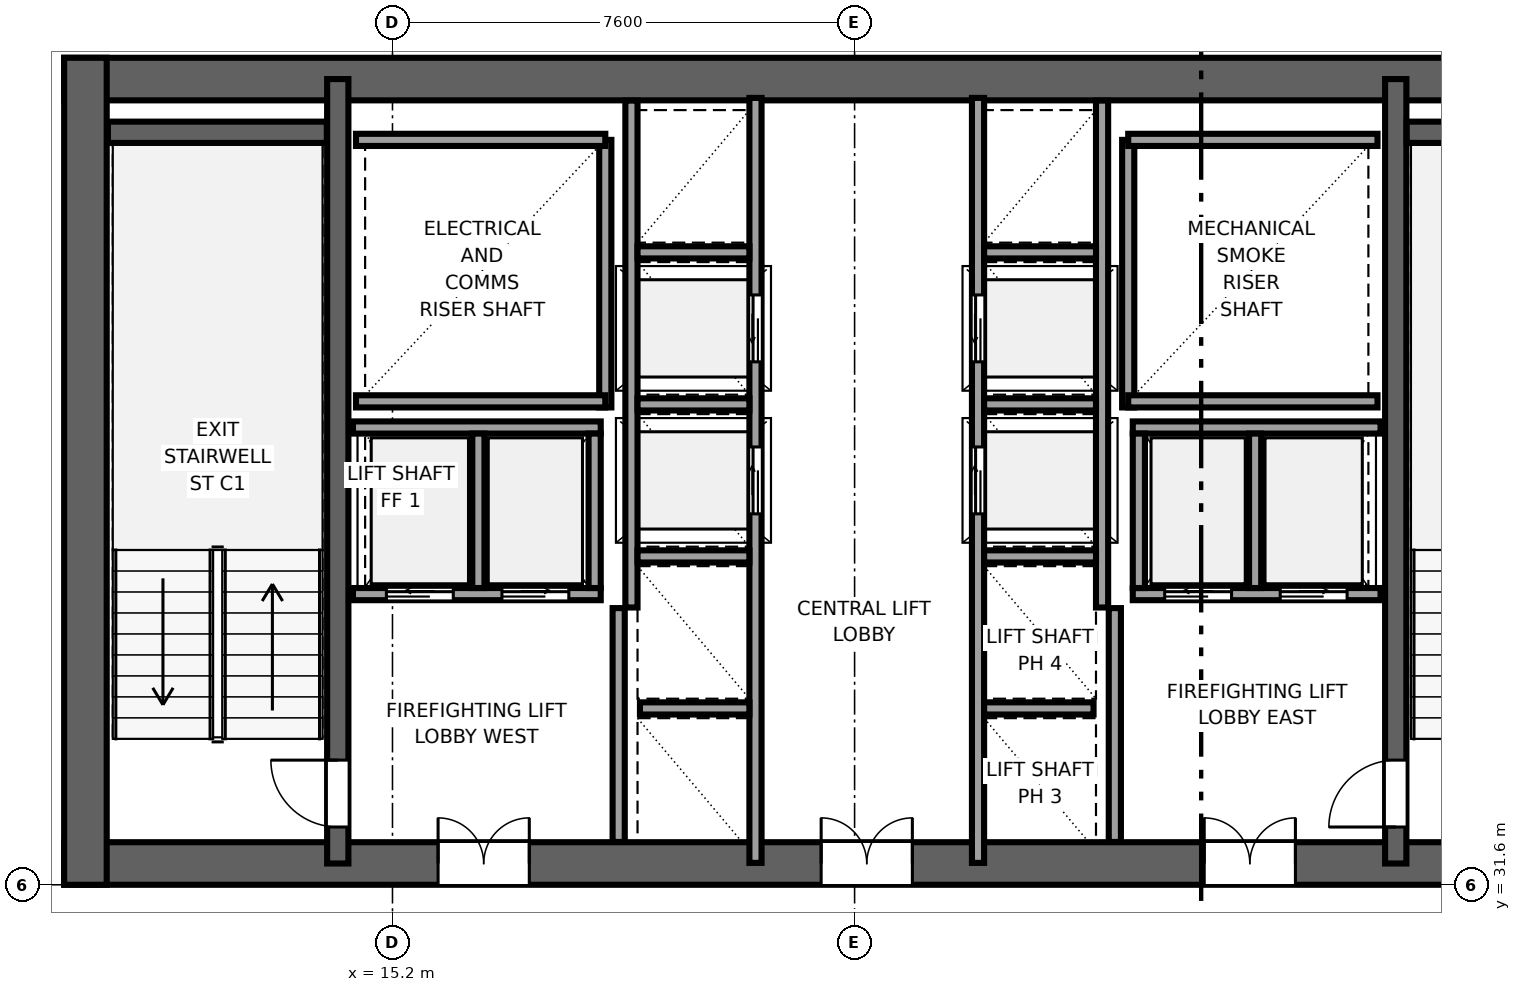
"""IFC4 building model, lengths in metres.
Left out: names, types, materials, properties, quantities, classifications, styles, units other than length and angle.
Written with IfcOpenShell. Run it as: python <this file> out.ifc"""

import sys

from ifc_helpers import new_model, si_unit, direction, frame, frame_2d, origin, place, context, subcontext, project, spatial, rectangle, extrude, source, transform, mapped, element, fill, save


model = new_model("IFC4")
c1 = context("Model", 3, precision=1e-05, world=origin(), true_north=direction((0.0, 1.0)))
c2 = subcontext(c1, "Body", "Model", "MODEL_VIEW")
j1 = project(units=[si_unit("LENGTHUNIT", "METRE"), si_unit("PLANEANGLEUNIT", "RADIAN")], contexts=[c1])
p1 = place(None, origin())
s1 = spatial("IfcSite", under=j1, at=p1, CompositionType="ELEMENT")
p2 = place(p1, origin())
s2 = spatial("IfcBuilding", under=s1, at=p2, CompositionType="ELEMENT")
p3 = place(p2, frame((0.0, 0.0, 150.6)))
s3 = spatial("IfcBuildingStorey", under=s2, at=p3, CompositionType="ELEMENT", Elevation=150.6)
p4 = place(p3, frame((9.8, 31.95, 0.0), z_axis=(0.0, 0.0, 1.0), x_axis=(1.0, 0.0, 0.0)))
e1 = element("IfcWall", 1, at=p4, inside=s3, PredefinedType="SHEAR", context=c2, shape_type="SweptSolid", body=[
    extrude(rectangle(XDim=26.4, YDim=0.7, at=frame_2d((13.2, 0.0))), origin(), (0.0, 0.0, 1.0), 3.55),
])
p5 = place(p4, frame((7.65, 0.0, 0.0), z_axis=(0.0, 0.0, 1.0), x_axis=(-1.0, 0.0, 0.0)))
e2 = element("IfcOpeningElement", 2, at=p5, cuts=e1, PredefinedType="OPENING", context=c2, shape_type="SweptSolid", body=[
    extrude(rectangle(XDim=1.5, YDim=2.04, at=frame_2d((0.75, 1.02))), frame((0.0, 0.36, 0.0), z_axis=(0.0, -1.0, 0.0), x_axis=(1.0, 0.0, 0.0)), (0.0, 0.0, 1.0), 0.72),
])
p6 = place(p4, frame((13.95, 0.0, 0.0), z_axis=(0.0, 0.0, 1.0), x_axis=(-1.0, 0.0, 0.0)))
e3 = element("IfcOpeningElement", 3, at=p6, cuts=e1, PredefinedType="OPENING", context=c2, shape_type="SweptSolid", body=[
    extrude(rectangle(XDim=1.5, YDim=2.04, at=frame_2d((0.75, 1.02))), frame((0.0, 0.36, 0.0), z_axis=(0.0, -1.0, 0.0), x_axis=(1.0, 0.0, 0.0)), (0.0, 0.0, 1.0), 0.72),
])
p7 = place(p4, frame((20.25, 0.0, 0.0), z_axis=(0.0, 0.0, 1.0), x_axis=(-1.0, 0.0, 0.0)))
e4 = element("IfcOpeningElement", 4, at=p7, cuts=e1, PredefinedType="OPENING", context=c2, shape_type="SweptSolid", body=[
    extrude(rectangle(XDim=1.5, YDim=2.04, at=frame_2d((0.75, 1.02))), frame((0.0, 0.36, 0.0), z_axis=(0.0, -1.0, 0.0), x_axis=(1.0, 0.0, 0.0)), (0.0, 0.0, 1.0), 0.72),
])
p8 = place(p3, frame((9.8, 44.85, 0.0), z_axis=(0.0, 0.0, 1.0), x_axis=(1.0, 0.0, 0.0)))
e5 = element("IfcWall", 5, at=p8, inside=s3, PredefinedType="SHEAR", context=c2, shape_type="SweptSolid", body=[
    extrude(rectangle(XDim=26.4, YDim=0.7, at=frame_2d((13.2, 0.0))), origin(), (0.0, 0.0, 1.0), 3.55),
])
p9 = place(p3, frame((10.15, 31.6, 0.0), z_axis=(0.0, 0.0, 1.0), x_axis=(0.0, 1.0, 0.0)))
e6 = element("IfcWall", 6, at=p9, inside=s3, PredefinedType="SHEAR", context=c2, shape_type="SweptSolid", body=[
    extrude(rectangle(XDim=13.6, YDim=0.7, at=frame_2d((6.8, 0.0))), origin(), (0.0, 0.0, 1.0), 3.55),
])
p10 = place(p3, frame((14.3, 31.95, 0.0), z_axis=(0.0, 0.0, 1.0), x_axis=(0.0, 1.0, 0.0)))
e7 = element("IfcWall", 7, at=p10, inside=s3, PredefinedType="SHEAR", context=c2, shape_type="SweptSolid", body=[
    extrude(rectangle(XDim=12.9, YDim=0.35, at=frame_2d((6.45, 0.0))), origin(), (0.0, 0.0, 1.0), 3.55),
])
p11 = place(p10, frame((0.6, 0.0, 0.0)))
e8 = element("IfcOpeningElement", 8, at=p11, cuts=e7, PredefinedType="OPENING", context=c2, shape_type="SweptSolid", body=[
    extrude(rectangle(XDim=1.1, YDim=2.12, at=frame_2d((0.55, 1.06))), frame((0.0, 0.185, 0.0), z_axis=(0.0, -1.0, 0.0), x_axis=(1.0, 0.0, 0.0)), (0.0, 0.0, 1.0), 0.37),
])
p12 = place(p3, frame((31.7, 31.95, 0.0), z_axis=(0.0, 0.0, 1.0), x_axis=(0.0, 1.0, 0.0)))
e9 = element("IfcWall", 9, at=p12, inside=s3, PredefinedType="SHEAR", context=c2, shape_type="SweptSolid", body=[
    extrude(rectangle(XDim=12.9, YDim=0.35, at=frame_2d((6.45, 0.0))), origin(), (0.0, 0.0, 1.0), 3.55),
])
p13 = place(p12, frame((1.7, 0.0, 0.0), z_axis=(0.0, 0.0, 1.0), x_axis=(-1.0, 0.0, 0.0)))
e10 = element("IfcOpeningElement", 10, at=p13, cuts=e9, PredefinedType="OPENING", context=c2, shape_type="SweptSolid", body=[
    extrude(rectangle(XDim=1.1, YDim=2.12, at=frame_2d((0.55, 1.06))), frame((0.0, 0.185, 0.0), z_axis=(0.0, -1.0, 0.0), x_axis=(1.0, 0.0, 0.0)), (0.0, 0.0, 1.0), 0.37),
])
for number, where, z_axis, x_axis in (
    (11, (10.52, 43.975, 0.0), (0.0, 0.0, 1.0), (1.0, 0.0, 0.0)),
    (12, (31.88, 43.975, 0.0), (0.0, 0.0, 1.0), (1.0, 0.0, 0.0)),
):
    element("IfcWall", number, at=place(p3, frame(where, z_axis=z_axis, x_axis=x_axis)), inside=s3, PredefinedType="SHEAR", context=c2, shape_type="SweptSolid", body=[
        extrude(rectangle(XDim=3.6, YDim=0.35, at=frame_2d((1.8, 0.0))), origin(), (0.0, 0.0, 1.0), 3.55),
    ])
p14 = place(p3, frame((18.7, 39.45, 0.0), z_axis=(0.0, 0.0, 1.0), x_axis=(0.0, 1.0, 0.0)))
e13 = element("IfcWall", 13, at=p14, inside=s3, PredefinedType="SOLIDWALL", context=c2, shape_type="SweptSolid", body=[
    extrude(rectangle(XDim=4.4, YDim=0.2, at=frame_2d((2.2, 0.0))), origin(), (0.0, 0.0, 1.0), 3.37),
])
for number, where, z_axis, x_axis in (
    (14, (14.6, 39.55, 0.0), (0.0, 0.0, 1.0), (1.0, 0.0, 0.0)),
    (15, (14.6, 43.85, 0.0), (0.0, 0.0, 1.0), (1.0, 0.0, 0.0)),
):
    element("IfcWall", number, at=place(p3, frame(where, z_axis=z_axis, x_axis=x_axis)), inside=s3, PredefinedType="SOLIDWALL", context=c2, shape_type="SweptSolid", body=[
        extrude(rectangle(XDim=4.1, YDim=0.2, at=frame_2d((2.05, 0.0))), origin(), (0.0, 0.0, 1.0), 3.37),
    ])
p15 = place(p3, frame((27.3, 39.45, 0.0), z_axis=(0.0, 0.0, 1.0), x_axis=(0.0, 1.0, 0.0)))
e16 = element("IfcWall", 16, at=p15, inside=s3, PredefinedType="SOLIDWALL", context=c2, shape_type="SweptSolid", body=[
    extrude(rectangle(XDim=4.4, YDim=0.2, at=frame_2d((2.2, 0.0))), origin(), (0.0, 0.0, 1.0), 3.37),
])
for number, where, z_axis, x_axis in (
    (17, (27.3, 39.55, 0.0), (0.0, 0.0, 1.0), (1.0, 0.0, 0.0)),
    (18, (27.3, 43.85, 0.0), (0.0, 0.0, 1.0), (1.0, 0.0, 0.0)),
):
    element("IfcWall", number, at=place(p3, frame(where, z_axis=z_axis, x_axis=x_axis)), inside=s3, PredefinedType="SOLIDWALL", context=c2, shape_type="SweptSolid", body=[
        extrude(rectangle(XDim=4.1, YDim=0.2, at=frame_2d((2.05, 0.0))), origin(), (0.0, 0.0, 1.0), 3.37),
    ])
for number, where, z_axis, x_axis in (
    (19, (18.92, 32.304, 0.0), (0.0, 0.0, 1.0), (0.0, 1.0, 0.0)),
    (20, (27.08, 32.304, 0.0), (0.0, 0.0, 1.0), (0.0, 1.0, 0.0)),
):
    element("IfcWall", number, at=place(p3, frame(where, z_axis=z_axis, x_axis=x_axis)), inside=s3, PredefinedType="SOLIDWALL", context=c2, shape_type="SweptSolid", body=[
        extrude(rectangle(XDim=3.846, YDim=0.2, at=frame_2d((1.923, 0.0))), origin(), (0.0, 0.0, 1.0), 3.37),
    ])
p16 = place(p3, frame((21.17, 31.96, 0.0), z_axis=(0.0, 0.0, 1.0), x_axis=(0.0, 1.0, 0.0)))
e21 = element("IfcWall", 21, at=p16, inside=s3, PredefinedType="SOLIDWALL", context=c2, shape_type="SweptSolid", body=[
    extrude(rectangle(XDim=12.58, YDim=0.2, at=frame_2d((6.29, 0.0))), origin(), (0.0, 0.0, 1.0), 3.37),
])
p17 = place(p16, frame((5.74, 0.0, 0.0)))
e22 = element("IfcOpeningElement", 22, at=p17, cuts=e21, PredefinedType="OPENING", context=c2, shape_type="SweptSolid", body=[
    extrude(rectangle(XDim=1.1, YDim=2.12, at=frame_2d((0.55, 1.06))), frame((0.0, 0.11, 0.0), z_axis=(0.0, -1.0, 0.0), x_axis=(1.0, 0.0, 0.0)), (0.0, 0.0, 1.0), 0.22),
])
p18 = place(p16, frame((8.24, 0.0, 0.0)))
e23 = element("IfcOpeningElement", 23, at=p18, cuts=e21, PredefinedType="OPENING", context=c2, shape_type="SweptSolid", body=[
    extrude(rectangle(XDim=1.1, YDim=2.12, at=frame_2d((0.55, 1.06))), frame((0.0, 0.11, 0.0), z_axis=(0.0, -1.0, 0.0), x_axis=(1.0, 0.0, 0.0)), (0.0, 0.0, 1.0), 0.22),
])
p19 = place(p3, frame((19.13, 36.16, 0.0), z_axis=(0.0, 0.0, 1.0), x_axis=(0.0, 1.0, 0.0)))
e24 = element("IfcWall", 24, at=p19, inside=s3, PredefinedType="SOLIDWALL", context=c2, shape_type="SweptSolid", body=[
    extrude(rectangle(XDim=8.336, YDim=0.2, at=frame_2d((4.168, 0.0))), origin(), (0.0, 0.0, 1.0), 3.37),
])
p20 = place(p3, frame((19.27, 34.5, 0.0), z_axis=(0.0, 0.0, 1.0), x_axis=(1.0, 0.0, 0.0)))
e25 = element("IfcWall", 25, at=p20, inside=s3, PredefinedType="SOLIDWALL", context=c2, shape_type="SweptSolid", body=[
    extrude(rectangle(XDim=1.8, YDim=0.2, at=frame_2d((0.9, 0.0))), origin(), (0.0, 0.0, 1.0), 3.37),
])
for number, where, z_axis, x_axis in (
    (26, (19.23, 37.0, 0.0), (0.0, 0.0, 1.0), (1.0, 0.0, 0.0)),
    (27, (19.23, 39.5, 0.0), (0.0, 0.0, 1.0), (1.0, 0.0, 0.0)),
    (28, (19.23, 42.0, 0.0), (0.0, 0.0, 1.0), (1.0, 0.0, 0.0)),
):
    element("IfcWall", number, at=place(p3, frame(where, z_axis=z_axis, x_axis=x_axis)), inside=s3, PredefinedType="SOLIDWALL", context=c2, shape_type="SweptSolid", body=[
        extrude(rectangle(XDim=1.84, YDim=0.2, at=frame_2d((0.92, 0.0))), origin(), (0.0, 0.0, 1.0), 3.37),
    ])
p21 = place(p3, frame((27.375, 36.38, 0.0), z_axis=(0.0, 0.0, 1.0), x_axis=(1.0, 0.0, 0.0)))
e29 = element("IfcWall", 29, at=p21, inside=s3, PredefinedType="SOLIDWALL", context=c2, shape_type="SweptSolid", body=[
    extrude(rectangle(XDim=4.075, YDim=0.2, at=frame_2d((2.038, 0.0))), origin(), (0.0, 0.0, 1.0), 3.37),
])
p22 = place(p21, frame((0.525, 0.0, 0.0)))
e30 = element("IfcOpeningElement", 30, at=p22, cuts=e29, PredefinedType="OPENING", context=c2, shape_type="SweptSolid", body=[
    extrude(rectangle(XDim=1.1, YDim=2.12, at=frame_2d((0.55, 1.06))), frame((0.0, 0.11, 0.0), z_axis=(0.0, -1.0, 0.0), x_axis=(1.0, 0.0, 0.0)), (0.0, 0.0, 1.0), 0.22),
])
p23 = place(p21, frame((2.425, 0.0, 0.0)))
e31 = element("IfcOpeningElement", 31, at=p23, cuts=e29, PredefinedType="OPENING", context=c2, shape_type="SweptSolid", body=[
    extrude(rectangle(XDim=1.1, YDim=2.12, at=frame_2d((0.55, 1.06))), frame((0.0, 0.11, 0.0), z_axis=(0.0, -1.0, 0.0), x_axis=(1.0, 0.0, 0.0)), (0.0, 0.0, 1.0), 0.22),
])
p24 = place(p3, frame((27.375, 39.12, 0.0), z_axis=(0.0, 0.0, 1.0), x_axis=(1.0, 0.0, 0.0)))
e32 = element("IfcWall", 32, at=p24, inside=s3, PredefinedType="SOLIDWALL", context=c2, shape_type="SweptSolid", body=[
    extrude(rectangle(XDim=4.075, YDim=0.2, at=frame_2d((2.038, 0.0))), origin(), (0.0, 0.0, 1.0), 3.37),
])
for number, where, z_axis, x_axis in (
    (33, (27.475, 36.48, 0.0), (0.0, 0.0, 1.0), (0.0, 1.0, 0.0)),
    (34, (29.387, 36.48, 0.0), (0.0, 0.0, 1.0), (0.0, 1.0, 0.0)),
):
    element("IfcWall", number, at=place(p3, frame(where, z_axis=z_axis, x_axis=x_axis)), inside=s3, PredefinedType="SOLIDWALL", context=c2, shape_type="SweptSolid", body=[
        extrude(rectangle(XDim=2.54, YDim=0.2, at=frame_2d((1.27, 0.0))), origin(), (0.0, 0.0, 1.0), 3.37),
    ])
p25 = place(p3, frame((14.55, 36.38, 0.0), z_axis=(0.0, 0.0, 1.0), x_axis=(1.0, 0.0, 0.0)))
e35 = element("IfcWall", 35, at=p25, inside=s3, PredefinedType="SOLIDWALL", context=c2, shape_type="SweptSolid", body=[
    extrude(rectangle(XDim=4.075, YDim=0.2, at=frame_2d((2.038, 0.0))), origin(), (0.0, 0.0, 1.0), 3.37),
])
p26 = place(p25, frame((0.55, 0.0, 0.0)))
e36 = element("IfcOpeningElement", 36, at=p26, cuts=e35, PredefinedType="OPENING", context=c2, shape_type="SweptSolid", body=[
    extrude(rectangle(XDim=1.1, YDim=2.12, at=frame_2d((0.55, 1.06))), frame((0.0, 0.11, 0.0), z_axis=(0.0, -1.0, 0.0), x_axis=(1.0, 0.0, 0.0)), (0.0, 0.0, 1.0), 0.22),
])
p27 = place(p25, frame((2.45, 0.0, 0.0)))
e37 = element("IfcOpeningElement", 37, at=p27, cuts=e35, PredefinedType="OPENING", context=c2, shape_type="SweptSolid", body=[
    extrude(rectangle(XDim=1.1, YDim=2.12, at=frame_2d((0.55, 1.06))), frame((0.0, 0.11, 0.0), z_axis=(0.0, -1.0, 0.0), x_axis=(1.0, 0.0, 0.0)), (0.0, 0.0, 1.0), 0.22),
])
p28 = place(p3, frame((14.55, 39.12, 0.0), z_axis=(0.0, 0.0, 1.0), x_axis=(1.0, 0.0, 0.0)))
e38 = element("IfcWall", 38, at=p28, inside=s3, PredefinedType="SOLIDWALL", context=c2, shape_type="SweptSolid", body=[
    extrude(rectangle(XDim=4.075, YDim=0.2, at=frame_2d((2.038, 0.0))), origin(), (0.0, 0.0, 1.0), 3.37),
])
for number, where, z_axis, x_axis in (
    (39, (18.525, 36.48, 0.0), (0.0, 0.0, 1.0), (0.0, 1.0, 0.0)),
    (40, (16.613, 36.48, 0.0), (0.0, 0.0, 1.0), (0.0, 1.0, 0.0)),
):
    element("IfcWall", number, at=place(p3, frame(where, z_axis=z_axis, x_axis=x_axis)), inside=s3, PredefinedType="SOLIDWALL", context=c2, shape_type="SweptSolid", body=[
        extrude(rectangle(XDim=2.54, YDim=0.2, at=frame_2d((1.27, 0.0))), origin(), (0.0, 0.0, 1.0), 3.37),
    ])
p29 = place(p3, frame((24.83, 31.96, 0.0), z_axis=(0.0, 0.0, 1.0), x_axis=(0.0, 1.0, 0.0)))
e41 = element("IfcWall", 41, at=p29, inside=s3, PredefinedType="SOLIDWALL", context=c2, shape_type="SweptSolid", body=[
    extrude(rectangle(XDim=12.58, YDim=0.2, at=frame_2d((6.29, 0.0))), origin(), (0.0, 0.0, 1.0), 3.37),
])
p30 = place(p29, frame((5.74, 0.0, 0.0)))
e42 = element("IfcOpeningElement", 42, at=p30, cuts=e41, PredefinedType="OPENING", context=c2, shape_type="SweptSolid", body=[
    extrude(rectangle(XDim=1.1, YDim=2.12, at=frame_2d((0.55, 1.06))), frame((0.0, 0.11, 0.0), z_axis=(0.0, -1.0, 0.0), x_axis=(1.0, 0.0, 0.0)), (0.0, 0.0, 1.0), 0.22),
])
p31 = place(p29, frame((8.24, 0.0, 0.0)))
e43 = element("IfcOpeningElement", 43, at=p31, cuts=e41, PredefinedType="OPENING", context=c2, shape_type="SweptSolid", body=[
    extrude(rectangle(XDim=1.1, YDim=2.12, at=frame_2d((0.55, 1.06))), frame((0.0, 0.11, 0.0), z_axis=(0.0, -1.0, 0.0), x_axis=(1.0, 0.0, 0.0)), (0.0, 0.0, 1.0), 0.22),
])
p32 = place(p3, frame((26.87, 36.16, 0.0), z_axis=(0.0, 0.0, 1.0), x_axis=(0.0, 1.0, 0.0)))
e44 = element("IfcWall", 44, at=p32, inside=s3, PredefinedType="SOLIDWALL", context=c2, shape_type="SweptSolid", body=[
    extrude(rectangle(XDim=8.336, YDim=0.2, at=frame_2d((4.168, 0.0))), origin(), (0.0, 0.0, 1.0), 3.37),
])
p33 = place(p3, frame((24.93, 34.5, 0.0), z_axis=(0.0, 0.0, 1.0), x_axis=(1.0, 0.0, 0.0)))
e45 = element("IfcWall", 45, at=p33, inside=s3, PredefinedType="SOLIDWALL", context=c2, shape_type="SweptSolid", body=[
    extrude(rectangle(XDim=1.8, YDim=0.2, at=frame_2d((0.9, 0.0))), origin(), (0.0, 0.0, 1.0), 3.37),
])
for number, where, z_axis, x_axis in (
    (46, (24.93, 37.0, 0.0), (0.0, 0.0, 1.0), (1.0, 0.0, 0.0)),
    (47, (24.93, 39.5, 0.0), (0.0, 0.0, 1.0), (1.0, 0.0, 0.0)),
    (48, (24.93, 42.0, 0.0), (0.0, 0.0, 1.0), (1.0, 0.0, 0.0)),
):
    element("IfcWall", number, at=place(p3, frame(where, z_axis=z_axis, x_axis=x_axis)), inside=s3, PredefinedType="SOLIDWALL", context=c2, shape_type="SweptSolid", body=[
        extrude(rectangle(XDim=1.84, YDim=0.2, at=frame_2d((0.92, 0.0))), origin(), (0.0, 0.0, 1.0), 3.37),
    ])
m1 = source(origin(), c2, "Body", "SweptSolid", [
    extrude(rectangle(XDim=1.1, YDim=2.12, at=frame_2d((0.55, 1.06))), frame((0.0, 0.025, 0.0), z_axis=(0.0, -1.0, 0.0), x_axis=(1.0, 0.0, 0.0)), (0.0, 0.0, 1.0), 0.05),
])
p34 = place(p11, origin())
e49 = element("IfcDoor", 49, at=p34, inside=s3, OperationType="SINGLE_SWING_RIGHT", PredefinedType="DOOR", context=c2, shape_type="MappedRepresentation", body=[
    mapped(m1, transform((0.0, 0.0, 0.0), x_axis=(1.0, 0.0, 0.0), y_axis=(0.0, 1.0, 0.0), z_axis=(0.0, 0.0, 1.0), scale=1.0)),
])
fill(e8, e49)
p35 = place(p13, origin())
e50 = element("IfcDoor", 50, at=p35, inside=s3, OperationType="SINGLE_SWING_LEFT", PredefinedType="DOOR", context=c2, shape_type="MappedRepresentation", body=[
    mapped(m1, transform((0.0, 0.0, 0.0), x_axis=(1.0, 0.0, 0.0), y_axis=(0.0, 1.0, 0.0), z_axis=(0.0, 0.0, 1.0), scale=1.0)),
])
fill(e10, e50)
m2 = source(origin(), c2, "Body", "SweptSolid", [
    extrude(rectangle(XDim=1.5, YDim=2.04, at=frame_2d((0.75, 1.02))), frame((0.0, 0.025, 0.0), z_axis=(0.0, -1.0, 0.0), x_axis=(1.0, 0.0, 0.0)), (0.0, 0.0, 1.0), 0.05),
])
p36 = place(p5, origin())
e51 = element("IfcDoor", 51, at=p36, inside=s3, OperationType="DOUBLE_DOOR_SINGLE_SWING", PredefinedType="DOOR", context=c2, shape_type="MappedRepresentation", body=[
    mapped(m2, transform((0.0, 0.0, 0.0), x_axis=(1.0, 0.0, 0.0), y_axis=(0.0, 1.0, 0.0), z_axis=(0.0, 0.0, 1.0), scale=1.0)),
])
fill(e2, e51)
p37 = place(p6, origin())
e52 = element("IfcDoor", 52, at=p37, inside=s3, OperationType="DOUBLE_DOOR_SINGLE_SWING", PredefinedType="DOOR", context=c2, shape_type="MappedRepresentation", body=[
    mapped(m2, transform((0.0, 0.0, 0.0), x_axis=(1.0, 0.0, 0.0), y_axis=(0.0, 1.0, 0.0), z_axis=(0.0, 0.0, 1.0), scale=1.0)),
])
fill(e3, e52)
p38 = place(p7, origin())
e53 = element("IfcDoor", 53, at=p38, inside=s3, OperationType="DOUBLE_DOOR_SINGLE_SWING", PredefinedType="DOOR", context=c2, shape_type="MappedRepresentation", body=[
    mapped(m2, transform((0.0, 0.0, 0.0), x_axis=(1.0, 0.0, 0.0), y_axis=(0.0, 1.0, 0.0), z_axis=(0.0, 0.0, 1.0), scale=1.0)),
])
fill(e4, e53)
m3 = source(origin(), c2, "Body", "SweptSolid", [
    extrude(rectangle(XDim=1.1, YDim=2.12, at=frame_2d((0.55, 1.06))), frame((0.0, 0.025, 0.0), z_axis=(0.0, -1.0, 0.0), x_axis=(1.0, 0.0, 0.0)), (0.0, 0.0, 1.0), 0.05),
])
p39 = place(p17, origin())
e54 = element("IfcDoor", 54, at=p39, inside=s3, OperationType="SLIDING_TO_RIGHT", PredefinedType="DOOR", context=c2, shape_type="MappedRepresentation", body=[
    mapped(m3, transform((0.0, 0.0, 0.0), x_axis=(1.0, 0.0, 0.0), y_axis=(0.0, 1.0, 0.0), z_axis=(0.0, 0.0, 1.0), scale=1.0)),
])
fill(e22, e54)
p40 = place(p18, origin())
e55 = element("IfcDoor", 55, at=p40, inside=s3, OperationType="SLIDING_TO_LEFT", PredefinedType="DOOR", context=c2, shape_type="MappedRepresentation", body=[
    mapped(m3, transform((0.0, 0.0, 0.0), x_axis=(1.0, 0.0, 0.0), y_axis=(0.0, 1.0, 0.0), z_axis=(0.0, 0.0, 1.0), scale=1.0)),
])
fill(e23, e55)
p41 = place(p22, origin())
e56 = element("IfcDoor", 56, at=p41, inside=s3, OperationType="SLIDING_TO_LEFT", PredefinedType="DOOR", context=c2, shape_type="MappedRepresentation", body=[
    mapped(m3, transform((0.0, 0.0, 0.0), x_axis=(1.0, 0.0, 0.0), y_axis=(0.0, 1.0, 0.0), z_axis=(0.0, 0.0, 1.0), scale=1.0)),
])
fill(e30, e56)
p42 = place(p23, origin())
e57 = element("IfcDoor", 57, at=p42, inside=s3, OperationType="SLIDING_TO_RIGHT", PredefinedType="DOOR", context=c2, shape_type="MappedRepresentation", body=[
    mapped(m3, transform((0.0, 0.0, 0.0), x_axis=(1.0, 0.0, 0.0), y_axis=(0.0, 1.0, 0.0), z_axis=(0.0, 0.0, 1.0), scale=1.0)),
])
fill(e31, e57)
p43 = place(p26, origin())
e58 = element("IfcDoor", 58, at=p43, inside=s3, OperationType="SLIDING_TO_LEFT", PredefinedType="DOOR", context=c2, shape_type="MappedRepresentation", body=[
    mapped(m3, transform((0.0, 0.0, 0.0), x_axis=(1.0, 0.0, 0.0), y_axis=(0.0, 1.0, 0.0), z_axis=(0.0, 0.0, 1.0), scale=1.0)),
])
fill(e36, e58)
p44 = place(p27, origin())
e59 = element("IfcDoor", 59, at=p44, inside=s3, OperationType="SLIDING_TO_RIGHT", PredefinedType="DOOR", context=c2, shape_type="MappedRepresentation", body=[
    mapped(m3, transform((0.0, 0.0, 0.0), x_axis=(1.0, 0.0, 0.0), y_axis=(0.0, 1.0, 0.0), z_axis=(0.0, 0.0, 1.0), scale=1.0)),
])
fill(e37, e59)
p45 = place(p30, origin())
e60 = element("IfcDoor", 60, at=p45, inside=s3, OperationType="SLIDING_TO_RIGHT", PredefinedType="DOOR", context=c2, shape_type="MappedRepresentation", body=[
    mapped(m3, transform((0.0, 0.0, 0.0), x_axis=(1.0, 0.0, 0.0), y_axis=(0.0, 1.0, 0.0), z_axis=(0.0, 0.0, 1.0), scale=1.0)),
])
fill(e42, e60)
p46 = place(p31, origin())
e61 = element("IfcDoor", 61, at=p46, inside=s3, OperationType="SLIDING_TO_LEFT", PredefinedType="DOOR", context=c2, shape_type="MappedRepresentation", body=[
    mapped(m3, transform((0.0, 0.0, 0.0), x_axis=(1.0, 0.0, 0.0), y_axis=(0.0, 1.0, 0.0), z_axis=(0.0, 0.0, 1.0), scale=1.0)),
])
fill(e43, e61)
save(model, sys.argv[1])
